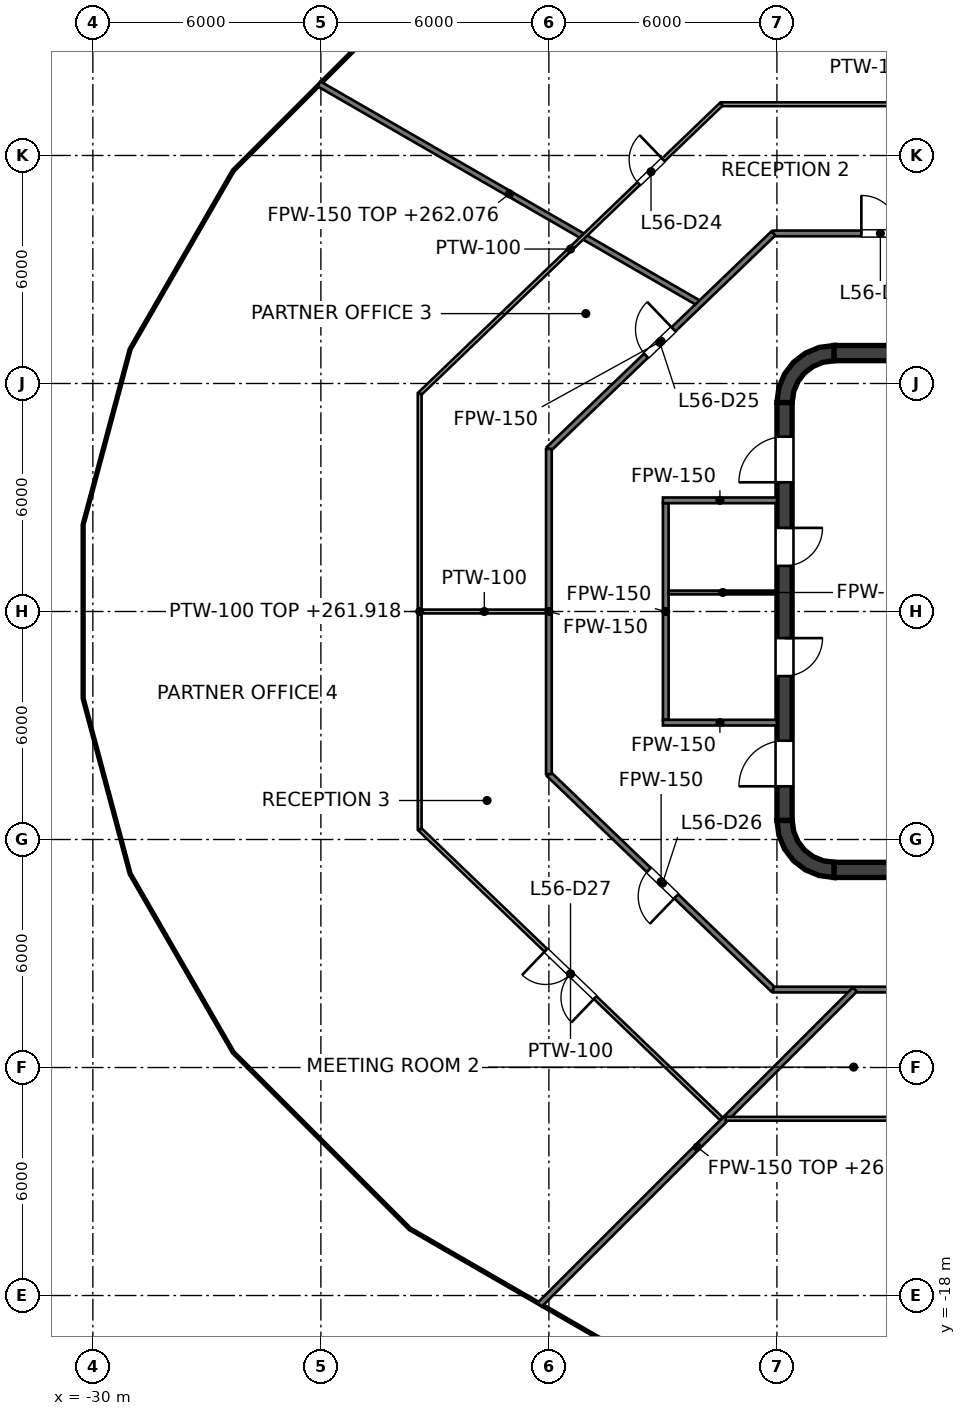
"""IFC4 building model, lengths in metres.
Left out: names, types, materials, properties, quantities, classifications, styles, units other than length and angle.
Written with IfcOpenShell. Run it as: python <this file> out.ifc"""

import sys

from ifc_helpers import new_model, si_unit, direction, frame, frame_2d, origin, place, context, subcontext, project, spatial, polyline, rectangle, outline, extrude, element, fill, save


model = new_model("IFC4")
c1 = context("Model", 3, precision=1e-05, world=origin(), true_north=direction((0.0, 1.0)))
c2 = subcontext(c1, "Body", "Model", "MODEL_VIEW")
j1 = project(units=[si_unit("LENGTHUNIT", "METRE"), si_unit("PLANEANGLEUNIT", "RADIAN")], contexts=[c1])
p1 = place(None, origin())
s1 = spatial("IfcSite", under=j1, at=p1, CompositionType="ELEMENT")
p2 = place(p1, origin())
s2 = spatial("IfcBuilding", under=s1, at=p2, CompositionType="ELEMENT")
p3 = place(p2, frame((0.0, 0.0, 259.0)))
s3 = spatial("IfcBuildingStorey", under=s2, at=p3, CompositionType="ELEMENT", Elevation=259.0)
for number, where, z_axis, x_axis in (
    (1, (-10.5, 6.8, 0.0), (0.0, 0.0, 1.0), (1.0, 0.0, 0.0)),
    (2, (-10.5, -6.8, 0.0), (0.0, 0.0, 1.0), (1.0, 0.0, 0.0)),
):
    element("IfcWall", number, at=place(p3, frame(where, z_axis=z_axis, x_axis=x_axis)), inside=s3, PredefinedType="SHEAR", context=c2, shape_type="SweptSolid", body=[
        extrude(rectangle(XDim=21.0, YDim=0.4, at=frame_2d((10.5, 0.0))), origin(), (0.0, 0.0, 1.0), 4.0),
    ])
p4 = place(p3, frame((-11.8, -5.5, 0.0), z_axis=(0.0, 0.0, 1.0), x_axis=(0.0, 1.0, 0.0)))
e3 = element("IfcWall", 3, at=p4, inside=s3, PredefinedType="SHEAR", context=c2, shape_type="SweptSolid", body=[
    extrude(rectangle(XDim=11.0, YDim=0.4, at=frame_2d((5.5, 0.0))), origin(), (0.0, 0.0, 1.0), 4.0),
])
p5 = place(p4, frame((3.8, 0.0, 0.0)))
e4 = element("IfcOpeningElement", 4, at=p5, cuts=e3, PredefinedType="OPENING", context=c2, shape_type="SweptSolid", body=[
    extrude(rectangle(XDim=1.0, YDim=2.1, at=frame_2d((0.5, 1.05))), frame((0.0, 0.2, 0.0), z_axis=(0.0, -1.0, 0.0), x_axis=(1.0, 0.0, 0.0)), (0.0, 0.0, 1.0), 0.4),
])
p6 = place(p4, frame((6.7, 0.0, 0.0)))
e5 = element("IfcOpeningElement", 5, at=p6, cuts=e3, PredefinedType="OPENING", context=c2, shape_type="SweptSolid", body=[
    extrude(rectangle(XDim=1.0, YDim=2.1, at=frame_2d((0.5, 1.05))), frame((0.0, 0.2, 0.0), z_axis=(0.0, -1.0, 0.0), x_axis=(1.0, 0.0, 0.0)), (0.0, 0.0, 1.0), 0.4),
])
p7 = place(p4, frame((0.9, 0.0, 0.0)))
e6 = element("IfcOpeningElement", 6, at=p7, cuts=e3, PredefinedType="OPENING", context=c2, shape_type="SweptSolid", body=[
    extrude(rectangle(XDim=1.2, YDim=2.1, at=frame_2d((0.6, 1.05))), frame((0.0, 0.2, 0.0), z_axis=(0.0, -1.0, 0.0), x_axis=(1.0, 0.0, 0.0)), (0.0, 0.0, 1.0), 0.4),
])
p8 = place(p4, frame((8.9, 0.0, 0.0)))
e7 = element("IfcOpeningElement", 7, at=p8, cuts=e3, PredefinedType="OPENING", context=c2, shape_type="SweptSolid", body=[
    extrude(rectangle(XDim=1.2, YDim=2.1, at=frame_2d((0.6, 1.05))), frame((0.0, 0.2, 0.0), z_axis=(0.0, -1.0, 0.0), x_axis=(1.0, 0.0, 0.0)), (0.0, 0.0, 1.0), 0.4),
])
p9 = place(p3, origin())
e8 = element("IfcWall", 8, at=p9, inside=s3, PredefinedType="SHEAR", context=c2, shape_type="SweptSolid", body=[
    extrude(outline(polyline([(-12.0, 5.5), (-11.596, 5.5), (-11.559, 5.784), (-11.45, 6.048), (-11.275, 6.275), (-11.048, 6.45), (-10.784, 6.559), (-10.5, 6.596), (-10.5, 7.0), (-10.888, 6.949), (-11.25, 6.799), (-11.561, 6.561), (-11.799, 6.25), (-11.949, 5.888), (-12.0, 5.5)])), origin(), (0.0, 0.0, 1.0), 4.0),
])
e9 = element("IfcWall", 9, at=p9, inside=s3, PredefinedType="SHEAR", context=c2, shape_type="SweptSolid", body=[
    extrude(outline(polyline([(-10.5, -7.0), (-10.5, -6.596), (-10.784, -6.559), (-11.048, -6.45), (-11.275, -6.275), (-11.45, -6.048), (-11.559, -5.784), (-11.596, -5.5), (-12.0, -5.5), (-11.949, -5.888), (-11.799, -6.25), (-11.561, -6.561), (-11.25, -6.799), (-10.888, -6.949), (-10.5, -7.0)])), origin(), (0.0, 0.0, 1.0), 4.0),
])
p10 = place(p3, frame((-14.925, -2.85, 0.0), z_axis=(0.0, 0.0, 1.0), x_axis=(0.0, 1.0, 0.0)))
e10 = element("IfcWall", 10, at=p10, inside=s3, PredefinedType="PARTITIONING", context=c2, shape_type="SweptSolid", body=[
    extrude(rectangle(XDim=5.7, YDim=0.15, at=frame_2d((2.85, 0.0))), origin(), (0.0, 0.0, 1.0), 2.918),
])
for number, where, z_axis, x_axis in (
    (11, (-15.0, 2.925, 0.0), (0.0, 0.0, 1.0), (1.0, 0.0, 0.0)),
    (12, (-15.0, -2.925, 0.0), (0.0, 0.0, 1.0), (1.0, 0.0, 0.0)),
):
    element("IfcWall", number, at=place(p3, frame(where, z_axis=z_axis, x_axis=x_axis)), inside=s3, PredefinedType="PARTITIONING", context=c2, shape_type="SweptSolid", body=[
        extrude(rectangle(XDim=3.0, YDim=0.15, at=frame_2d((1.5, 0.0))), origin(), (0.0, 0.0, 1.0), 2.918),
    ])
p11 = place(p3, frame((-14.85, 0.5, 0.0), z_axis=(0.0, 0.0, 1.0), x_axis=(1.0, 0.0, 0.0)))
e13 = element("IfcWall", 13, at=p11, inside=s3, PredefinedType="PARTITIONING", context=c2, shape_type="SweptSolid", body=[
    extrude(rectangle(XDim=2.85, YDim=0.1, at=frame_2d((1.425, 0.0))), origin(), (0.0, 0.0, 1.0), 3.85),
])
p12 = place(p3, frame((-18.0, -4.278, 0.0), z_axis=(0.0, 0.0, 1.0), x_axis=(0.721290181137, -0.692633001376, 0.0)))
e14 = element("IfcWall", 14, at=p12, inside=s3, PredefinedType="PARTITIONING", context=c2, shape_type="SweptSolid", body=[
    extrude(rectangle(XDim=8.187, YDim=0.15, at=frame_2d((4.094, 0.0))), origin(), (0.0, 0.0, 1.0), 2.918),
])
p13 = place(p12, frame((3.645, 0.0, 0.0)))
e15 = element("IfcOpeningElement", 15, at=p13, cuts=e14, PredefinedType="OPENING", context=c2, shape_type="SweptSolid", body=[
    extrude(rectangle(XDim=1.0, YDim=2.1, at=frame_2d((0.5, 1.05))), frame((0.0, 0.075, 0.0), z_axis=(0.0, -1.0, 0.0), x_axis=(1.0, 0.0, 0.0)), (0.0, 0.0, 1.0), 0.15),
])
p14 = place(p3, frame((-24.05, 13.885, 0.0), z_axis=(0.0, 0.0, 1.0), x_axis=(0.86602966053, -0.499992627028, 0.0)))
e16 = element("IfcWall", 16, at=p14, inside=s3, PredefinedType="PARTITIONING", context=c2, shape_type="SweptSolid", body=[
    extrude(rectangle(XDim=11.577, YDim=0.15, at=frame_2d((5.789, 0.0))), origin(), (0.0, 0.0, 1.0), 3.076),
])
p15 = place(p3, frame((-12.095, -9.949, 0.0), z_axis=(0.0, 0.0, 1.0), x_axis=(1.0, 0.0, 0.0)))
e17 = element("IfcWall", 17, at=p15, inside=s3, PredefinedType="PARTITIONING", context=c2, shape_type="SweptSolid", body=[
    extrude(rectangle(XDim=24.19, YDim=0.15, at=frame_2d((12.095, 0.0))), origin(), (0.0, 0.0, 1.0), 2.927),
])
p16 = place(p15, frame((4.086, 0.0, 0.0)))
e18 = element("IfcOpeningElement", 18, at=p16, cuts=e17, PredefinedType="OPENING", context=c2, shape_type="SweptSolid", body=[
    extrude(rectangle(XDim=1.0, YDim=2.1, at=frame_2d((0.5, 1.05))), frame((0.0, 0.075, 0.0), z_axis=(0.0, -1.0, 0.0), x_axis=(1.0, 0.0, 0.0)), (0.0, 0.0, 1.0), 0.15),
])
p17 = place(p15, frame((9.061, 0.0, 0.0)))
e19 = element("IfcOpeningElement", 19, at=p17, cuts=e17, PredefinedType="OPENING", context=c2, shape_type="SweptSolid", body=[
    extrude(rectangle(XDim=1.0, YDim=2.1, at=frame_2d((0.5, 1.05))), frame((0.0, 0.075, 0.0), z_axis=(0.0, -1.0, 0.0), x_axis=(1.0, 0.0, 0.0)), (0.0, 0.0, 1.0), 0.15),
])
p18 = place(p15, frame((14.417, 0.0, 0.0)))
e20 = element("IfcOpeningElement", 20, at=p18, cuts=e17, PredefinedType="OPENING", context=c2, shape_type="SweptSolid", body=[
    extrude(rectangle(XDim=1.0, YDim=2.1, at=frame_2d((0.5, 1.05))), frame((0.0, 0.075, 0.0), z_axis=(0.0, -1.0, 0.0), x_axis=(1.0, 0.0, 0.0)), (0.0, 0.0, 1.0), 0.15),
])
p19 = place(p3, frame((-12.095, 9.949, 0.0), z_axis=(0.0, 0.0, 1.0), x_axis=(1.0, 0.0, 0.0)))
e21 = element("IfcWall", 21, at=p19, inside=s3, PredefinedType="PARTITIONING", context=c2, shape_type="SweptSolid", body=[
    extrude(rectangle(XDim=24.19, YDim=0.15, at=frame_2d((12.095, 0.0))), origin(), (0.0, 0.0, 1.0), 2.927),
])
p20 = place(p19, frame((16.933, 0.0, 0.0)))
e22 = element("IfcOpeningElement", 22, at=p20, cuts=e21, PredefinedType="OPENING", context=c2, shape_type="SweptSolid", body=[
    extrude(rectangle(XDim=1.0, YDim=2.1, at=frame_2d((0.5, 1.05))), frame((0.0, 0.075, 0.0), z_axis=(0.0, -1.0, 0.0), x_axis=(1.0, 0.0, 0.0)), (0.0, 0.0, 1.0), 0.15),
])
p21 = place(p19, frame((10.255, 0.0, 0.0)))
e23 = element("IfcOpeningElement", 23, at=p21, cuts=e21, PredefinedType="OPENING", context=c2, shape_type="SweptSolid", body=[
    extrude(rectangle(XDim=1.0, YDim=2.1, at=frame_2d((0.5, 1.05))), frame((0.0, 0.075, 0.0), z_axis=(0.0, -1.0, 0.0), x_axis=(1.0, 0.0, 0.0)), (0.0, 0.0, 1.0), 0.15),
])
p22 = place(p19, frame((6.978, 0.0, 0.0)))
e24 = element("IfcOpeningElement", 24, at=p22, cuts=e21, PredefinedType="OPENING", context=c2, shape_type="SweptSolid", body=[
    extrude(rectangle(XDim=1.0, YDim=2.1, at=frame_2d((0.5, 1.05))), frame((0.0, 0.075, 0.0), z_axis=(0.0, -1.0, 0.0), x_axis=(1.0, 0.0, 0.0)), (0.0, 0.0, 1.0), 0.15),
])
p23 = place(p19, frame((2.317, 0.0, 0.0)))
e25 = element("IfcOpeningElement", 25, at=p23, cuts=e21, PredefinedType="OPENING", context=c2, shape_type="SweptSolid", body=[
    extrude(rectangle(XDim=1.0, YDim=2.1, at=frame_2d((0.5, 1.05))), frame((0.0, 0.075, 0.0), z_axis=(0.0, -1.0, 0.0), x_axis=(1.0, 0.0, 0.0)), (0.0, 0.0, 1.0), 0.15),
])
p24 = place(p3, frame((-18.0, 4.278, 0.0), z_axis=(0.0, 0.0, 1.0), x_axis=(0.721334282166, 0.692587072773, 0.0)))
e26 = element("IfcWall", 26, at=p24, inside=s3, PredefinedType="PARTITIONING", context=c2, shape_type="SweptSolid", body=[
    extrude(rectangle(XDim=8.187, YDim=0.15, at=frame_2d((4.094, 0.0))), origin(), (0.0, 0.0, 1.0), 2.918),
])
p25 = place(p24, frame((3.545, 0.0, 0.0)))
e27 = element("IfcOpeningElement", 27, at=p25, cuts=e26, PredefinedType="OPENING", context=c2, shape_type="SweptSolid", body=[
    extrude(rectangle(XDim=1.0, YDim=2.1, at=frame_2d((0.5, 1.05))), frame((0.0, 0.075, 0.0), z_axis=(0.0, -1.0, 0.0), x_axis=(1.0, 0.0, 0.0)), (0.0, 0.0, 1.0), 0.15),
])
p26 = place(p3, frame((-18.242, -18.242, 0.0), z_axis=(0.0, 0.0, 1.0), x_axis=(0.707106781187, 0.707106781187, 0.0)))
e28 = element("IfcWall", 28, at=p26, inside=s3, PredefinedType="PARTITIONING", context=c2, shape_type="SweptSolid", body=[
    extrude(rectangle(XDim=11.728, YDim=0.15, at=frame_2d((5.864, 0.0))), origin(), (0.0, 0.0, 1.0), 2.995),
])
p27 = place(p3, frame((-18.0, -4.278, 0.0), z_axis=(0.0, 0.0, 1.0), x_axis=(0.0, 1.0, 0.0)))
e29 = element("IfcWall", 29, at=p27, inside=s3, PredefinedType="PARTITIONING", context=c2, shape_type="SweptSolid", body=[
    extrude(rectangle(XDim=8.556, YDim=0.15, at=frame_2d((4.278, 0.0))), origin(), (0.0, 0.0, 1.0), 2.918),
])
p28 = place(p3, frame((-21.4, -5.727, 0.0), z_axis=(0.0, 0.0, 1.0), x_axis=(0.72128312314, -0.692640351317, 0.0)))
e30 = element("IfcWall", 30, at=p28, inside=s3, PredefinedType="PARTITIONING", context=c2, shape_type="SweptSolid", body=[
    extrude(rectangle(XDim=11.004, YDim=0.1, at=frame_2d((5.502, 0.0))), origin(), (0.0, 0.0, 1.0), 2.927),
])
p29 = place(p28, frame((4.603, 0.0, 0.0)))
e31 = element("IfcOpeningElement", 31, at=p29, cuts=e30, PredefinedType="OPENING", context=c2, shape_type="SweptSolid", body=[
    extrude(rectangle(XDim=1.8, YDim=2.1, at=frame_2d((0.9, 1.05))), frame((0.0, 0.05, 0.0), z_axis=(0.0, -1.0, 0.0), x_axis=(1.0, 0.0, 0.0)), (0.0, 0.0, 1.0), 0.1),
])
p30 = place(p3, frame((-13.349, -13.349, 0.0), z_axis=(0.0, 0.0, 1.0), x_axis=(1.0, 0.0, 0.0)))
e32 = element("IfcWall", 32, at=p30, inside=s3, PredefinedType="PARTITIONING", context=c2, shape_type="SweptSolid", body=[
    extrude(rectangle(XDim=26.812, YDim=0.1, at=frame_2d((13.406, 0.0))), origin(), (0.0, 0.0, 1.0), 2.927),
])
p31 = place(p30, frame((9.448, 0.0, 0.0)))
e33 = element("IfcOpeningElement", 33, at=p31, cuts=e32, PredefinedType="OPENING", context=c2, shape_type="SweptSolid", body=[
    extrude(rectangle(XDim=0.9, YDim=2.1, at=frame_2d((0.45, 1.05))), frame((0.0, 0.05, 0.0), z_axis=(0.0, -1.0, 0.0), x_axis=(1.0, 0.0, 0.0)), (0.0, 0.0, 1.0), 0.1),
])
p32 = place(p3, frame((-21.4, 0.0, 0.0), z_axis=(0.0, 0.0, 1.0), x_axis=(1.0, 0.0, 0.0)))
e34 = element("IfcWall", 34, at=p32, inside=s3, PredefinedType="PARTITIONING", context=c2, shape_type="SweptSolid", body=[
    extrude(rectangle(XDim=3.4, YDim=0.1, at=frame_2d((1.7, 0.0))), origin(), (0.0, 0.0, 1.0), 2.927),
])
p33 = place(p3, frame((-13.463, 13.349, 0.0), z_axis=(0.0, 0.0, 1.0), x_axis=(1.0, 0.0, 0.0)))
e35 = element("IfcWall", 35, at=p33, inside=s3, PredefinedType="PARTITIONING", context=c2, shape_type="SweptSolid", body=[
    extrude(rectangle(XDim=26.926, YDim=0.1, at=frame_2d((13.463, 0.0))), origin(), (0.0, 0.0, 1.0), 2.927),
])
p34 = place(p33, frame((19.31, 0.0, 0.0)))
e36 = element("IfcOpeningElement", 36, at=p34, cuts=e35, PredefinedType="OPENING", context=c2, shape_type="SweptSolid", body=[
    extrude(rectangle(XDim=1.8, YDim=2.1, at=frame_2d((0.9, 1.05))), frame((0.0, 0.05, 0.0), z_axis=(0.0, -1.0, 0.0), x_axis=(1.0, 0.0, 0.0)), (0.0, 0.0, 1.0), 0.1),
])
p35 = place(p3, frame((-21.4, 5.727, 0.0), z_axis=(0.0, 0.0, 1.0), x_axis=(0.721261394635, 0.692662977652, 0.0)))
e37 = element("IfcWall", 37, at=p35, inside=s3, PredefinedType="PARTITIONING", context=c2, shape_type="SweptSolid", body=[
    extrude(rectangle(XDim=11.004, YDim=0.1, at=frame_2d((5.502, 0.0))), origin(), (0.0, 0.0, 1.0), 2.927),
])
p36 = place(p35, frame((7.99, 0.0, 0.0)))
e38 = element("IfcOpeningElement", 38, at=p36, cuts=e37, PredefinedType="OPENING", context=c2, shape_type="SweptSolid", body=[
    extrude(rectangle(XDim=0.9, YDim=2.1, at=frame_2d((0.45, 1.05))), frame((0.0, 0.05, 0.0), z_axis=(0.0, -1.0, 0.0), x_axis=(1.0, 0.0, 0.0)), (0.0, 0.0, 1.0), 0.1),
])
p37 = place(p3, frame((-21.4, -5.727, 0.0), z_axis=(0.0, 0.0, 1.0), x_axis=(0.0, 1.0, 0.0)))
e39 = element("IfcWall", 39, at=p37, inside=s3, PredefinedType="PARTITIONING", context=c2, shape_type="SweptSolid", body=[
    extrude(rectangle(XDim=11.454, YDim=0.1, at=frame_2d((5.727, 0.0))), origin(), (0.0, 0.0, 1.0), 2.918),
])
p38 = place(p5, origin())
e40 = element("IfcDoor", 40, at=p38, inside=s3, OperationType="SINGLE_SWING_RIGHT", PredefinedType="DOOR", context=c2, shape_type="SweptSolid", body=[
    extrude(rectangle(XDim=1.0, YDim=2.1, at=frame_2d((0.5, 1.05))), frame((0.0, 0.025, 0.0), z_axis=(0.0, -1.0, 0.0), x_axis=(1.0, 0.0, 0.0)), (0.0, 0.0, 1.0), 0.05),
])
fill(e4, e40)
p39 = place(p6, origin())
e41 = element("IfcDoor", 41, at=p39, inside=s3, OperationType="SINGLE_SWING_RIGHT", PredefinedType="DOOR", context=c2, shape_type="SweptSolid", body=[
    extrude(rectangle(XDim=1.0, YDim=2.1, at=frame_2d((0.5, 1.05))), frame((0.0, 0.025, 0.0), z_axis=(0.0, -1.0, 0.0), x_axis=(1.0, 0.0, 0.0)), (0.0, 0.0, 1.0), 0.05),
])
fill(e5, e41)
p40 = place(p7, origin())
e42 = element("IfcDoor", 42, at=p40, inside=s3, OperationType="SINGLE_SWING_LEFT", PredefinedType="DOOR", context=c2, shape_type="SweptSolid", body=[
    extrude(rectangle(XDim=1.2, YDim=2.1, at=frame_2d((0.6, 1.05))), frame((0.0, 0.025, 0.0), z_axis=(0.0, -1.0, 0.0), x_axis=(1.0, 0.0, 0.0)), (0.0, 0.0, 1.0), 0.05),
])
fill(e6, e42)
p41 = place(p8, origin())
e43 = element("IfcDoor", 43, at=p41, inside=s3, OperationType="SINGLE_SWING_LEFT", PredefinedType="DOOR", context=c2, shape_type="SweptSolid", body=[
    extrude(rectangle(XDim=1.2, YDim=2.1, at=frame_2d((0.6, 1.05))), frame((0.0, 0.025, 0.0), z_axis=(0.0, -1.0, 0.0), x_axis=(1.0, 0.0, 0.0)), (0.0, 0.0, 1.0), 0.05),
])
fill(e7, e43)
p42 = place(p23, origin())
e44 = element("IfcDoor", 44, at=p42, inside=s3, OperationType="SINGLE_SWING_LEFT", PredefinedType="DOOR", context=c2, shape_type="SweptSolid", body=[
    extrude(rectangle(XDim=1.0, YDim=2.1, at=frame_2d((0.5, 1.05))), frame((0.0, 0.025, 0.0), z_axis=(0.0, -1.0, 0.0), x_axis=(1.0, 0.0, 0.0)), (0.0, 0.0, 1.0), 0.05),
])
fill(e25, e44)
p43 = place(p36, origin())
e45 = element("IfcDoor", 45, at=p43, inside=s3, OperationType="SINGLE_SWING_RIGHT", PredefinedType="DOOR", context=c2, shape_type="SweptSolid", body=[
    extrude(rectangle(XDim=0.9, YDim=2.1, at=frame_2d((0.45, 1.05))), frame((0.0, 0.025, 0.0), z_axis=(0.0, -1.0, 0.0), x_axis=(1.0, 0.0, 0.0)), (0.0, 0.0, 1.0), 0.05),
])
fill(e38, e45)
p44 = place(p25, origin())
e46 = element("IfcDoor", 46, at=p44, inside=s3, OperationType="SINGLE_SWING_RIGHT", PredefinedType="DOOR", context=c2, shape_type="SweptSolid", body=[
    extrude(rectangle(XDim=1.0, YDim=2.1, at=frame_2d((0.5, 1.05))), frame((0.0, 0.025, 0.0), z_axis=(0.0, -1.0, 0.0), x_axis=(1.0, 0.0, 0.0)), (0.0, 0.0, 1.0), 0.05),
])
fill(e27, e46)
p45 = place(p13, origin())
e47 = element("IfcDoor", 47, at=p45, inside=s3, OperationType="SINGLE_SWING_RIGHT", PredefinedType="DOOR", context=c2, shape_type="SweptSolid", body=[
    extrude(rectangle(XDim=1.0, YDim=2.1, at=frame_2d((0.5, 1.05))), frame((0.0, 0.025, 0.0), z_axis=(0.0, -1.0, 0.0), x_axis=(1.0, 0.0, 0.0)), (0.0, 0.0, 1.0), 0.05),
])
fill(e15, e47)
p46 = place(p29, origin())
e48 = element("IfcDoor", 48, at=p46, inside=s3, OperationType="DOUBLE_DOOR_SINGLE_SWING", PredefinedType="DOOR", context=c2, shape_type="SweptSolid", body=[
    extrude(rectangle(XDim=1.8, YDim=2.1, at=frame_2d((0.9, 1.05))), frame((0.0, 0.025, 0.0), z_axis=(0.0, -1.0, 0.0), x_axis=(1.0, 0.0, 0.0)), (0.0, 0.0, 1.0), 0.05),
])
fill(e31, e48)
save(model, sys.argv[1])
